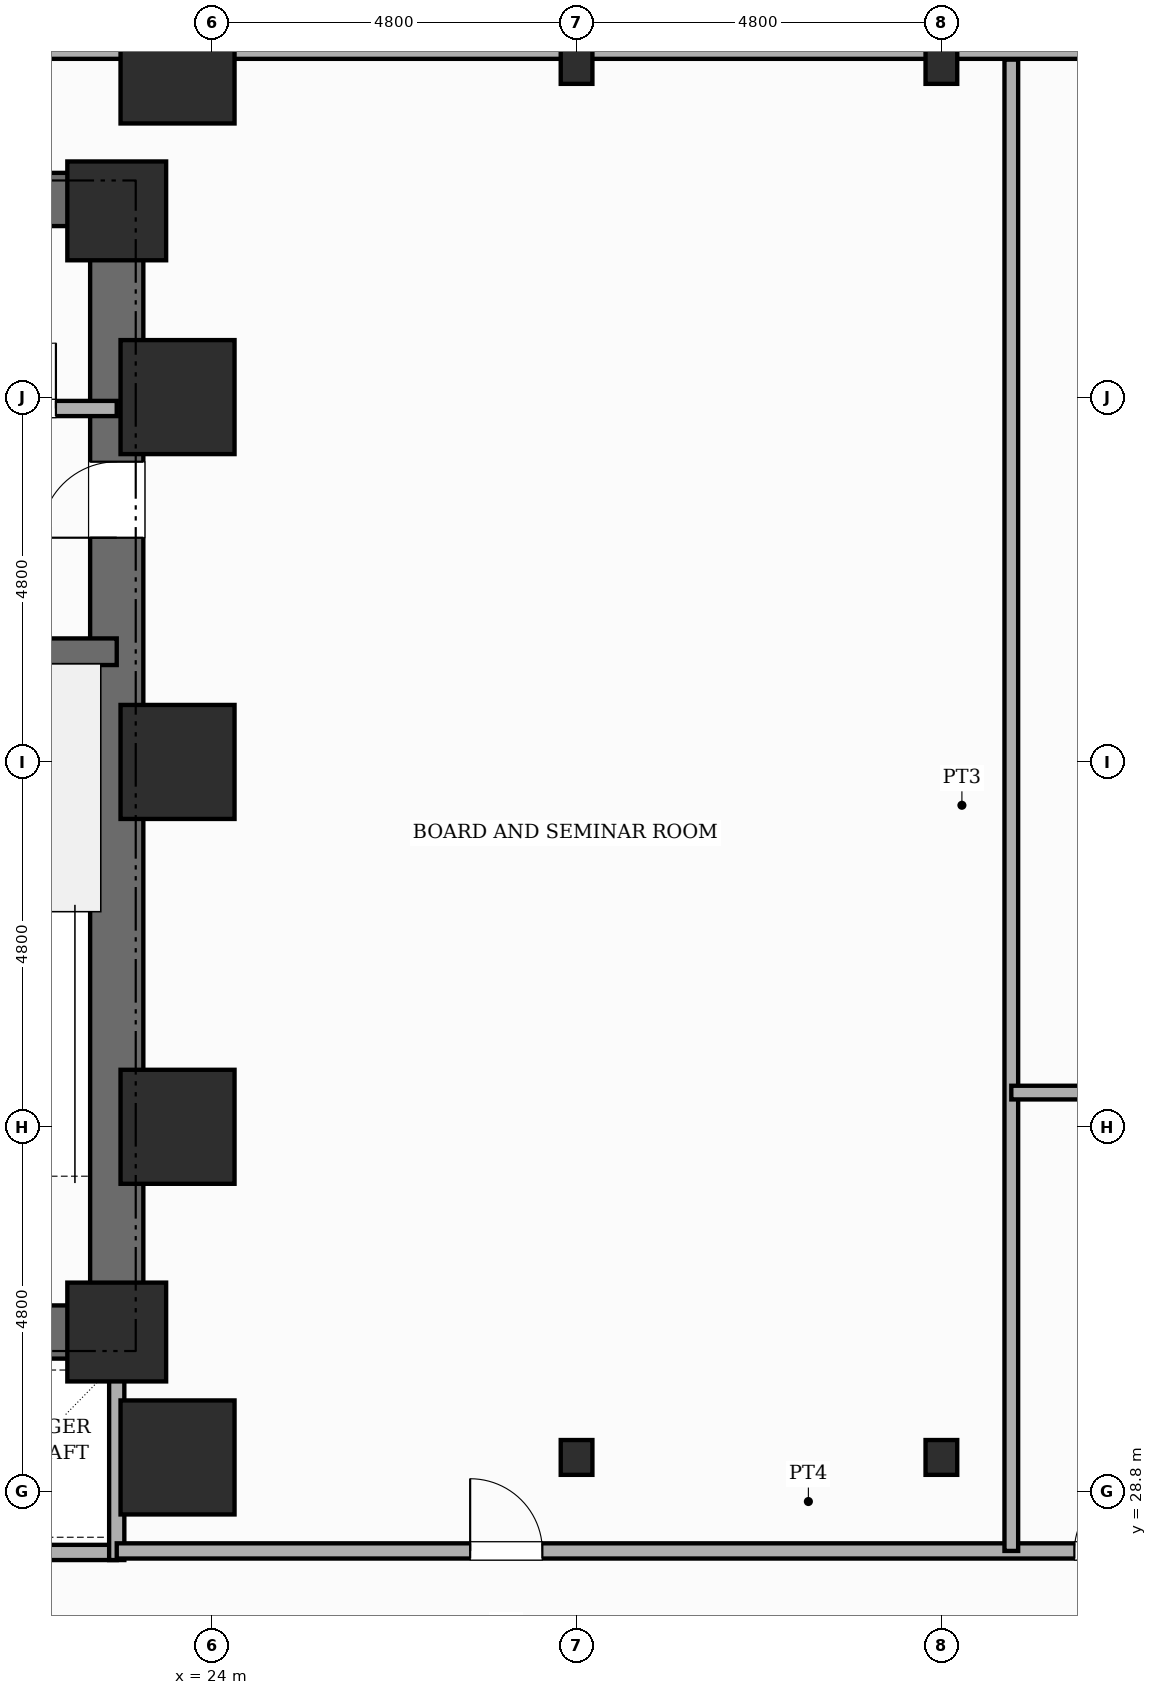
"""IFC4 building model, lengths in metres.
Left out: names, types, materials, properties, quantities, classifications, styles, units other than length and angle.
Written with IfcOpenShell. Run it as: python <this file> out.ifc"""

import sys

from ifc_helpers import new_model, si_unit, direction, frame, frame_2d, origin, origin_2d, place, context, subcontext, project, spatial, rectangle, i_section, extrude, element, fill, save


model = new_model("IFC4")
c1 = context("Model", 3, precision=1e-05, world=origin(), true_north=direction((0.0, 1.0)))
c2 = subcontext(c1, "Body", "Model", "MODEL_VIEW")
j1 = project(units=[si_unit("LENGTHUNIT", "METRE"), si_unit("PLANEANGLEUNIT", "RADIAN")], contexts=[c1])
p1 = place(None, origin())
s1 = spatial("IfcSite", under=j1, at=p1, CompositionType="ELEMENT")
p2 = place(p1, origin())
s2 = spatial("IfcBuilding", under=s1, at=p2, CompositionType="ELEMENT")
p3 = place(p2, frame((0.0, 0.0, 14.8)))
s3 = spatial("IfcBuildingStorey", under=s2, at=p3, CompositionType="ELEMENT", Elevation=14.8)
p4 = place(p3, frame((22.75, 30.55, 0.0), z_axis=(0.0, 0.0, 1.0), x_axis=(0.0, 1.0, 0.0)))
e1 = element("IfcWall", 1, at=p4, inside=s3, PredefinedType="SHEAR", context=c2, shape_type="SweptSolid", body=[
    extrude(rectangle(XDim=15.6, YDim=0.7, at=frame_2d((7.8, 0.0))), origin(), (0.0, 0.0, 1.0), 4.8),
])
p5 = place(p4, frame((10.8, 0.0, 0.0)))
e2 = element("IfcOpeningElement", 2, at=p5, cuts=e1, PredefinedType="OPENING", context=c2, shape_type="SweptSolid", body=[
    extrude(rectangle(XDim=1.0, YDim=2.15, at=frame_2d((0.5, 1.075))), frame((0.0, 0.36, 0.0), z_axis=(0.0, -1.0, 0.0), x_axis=(1.0, 0.0, 0.0)), (0.0, 0.0, 1.0), 0.72),
])
p6 = place(p3, frame((6.05, 45.8, 0.0), z_axis=(0.0, 0.0, 1.0), x_axis=(1.0, 0.0, 0.0)))
e3 = element("IfcWall", 3, at=p6, inside=s3, PredefinedType="SHEAR", context=c2, shape_type="SweptSolid", body=[
    extrude(rectangle(XDim=16.7, YDim=0.7, at=frame_2d((8.35, 0.0))), origin(), (0.0, 0.0, 1.0), 4.8),
])
p7 = place(p3, frame((18.84, 30.9, 0.0), z_axis=(0.0, 0.0, 1.0), x_axis=(1.0, 0.0, 0.0)))
e4 = element("IfcWall", 4, at=p7, inside=s3, PredefinedType="SHEAR", context=c2, shape_type="SweptSolid", body=[
    extrude(rectangle(XDim=3.91, YDim=0.7, at=frame_2d((1.955, 0.0))), origin(), (0.0, 0.0, 1.0), 4.8),
])
p8 = place(p3, frame((18.84, 39.85, 0.0), z_axis=(0.0, 0.0, 1.0), x_axis=(1.0, 0.0, 0.0)))
e5 = element("IfcWall", 5, at=p8, inside=s3, PredefinedType="SHEAR", context=c2, shape_type="SweptSolid", body=[
    extrude(rectangle(XDim=3.91, YDim=0.35, at=frame_2d((1.955, 0.0))), origin(), (0.0, 0.0, 1.0), 4.8),
])
for number, where, z_axis, x_axis in (
    (6, (22.75, 30.9, 0.0), (0.0, 0.0, 1.0), (1.0, 0.0, 0.0)),
    (7, (22.75, 45.65, 0.0), (0.0, 0.0, 1.0), (1.0, 0.0, 0.0)),
):
    element("IfcColumn", number, at=place(p3, frame(where, z_axis=z_axis, x_axis=x_axis)), inside=s3, PredefinedType="COLUMN", context=c2, shape_type="SweptSolid", body=[
        extrude(rectangle(XDim=1.3, YDim=1.3, at=origin_2d()), origin(), (0.0, 0.0, 1.0), 4.8),
    ])
for number, where, z_axis, x_axis in (
    (8, (23.55, 29.25, 0.0), (0.0, 0.0, 1.0), (1.0, 0.0, 0.0)),
    (9, (23.55, 33.6, 0.0), (0.0, 0.0, 1.0), (1.0, 0.0, 0.0)),
    (10, (23.55, 38.4, 0.0), (0.0, 0.0, 1.0), (1.0, 0.0, 0.0)),
    (11, (23.55, 43.2, 0.0), (0.0, 0.0, 1.0), (1.0, 0.0, 0.0)),
    (12, (23.55, 47.55, 0.0), (0.0, 0.0, 1.0), (1.0, 0.0, 0.0)),
):
    element("IfcColumn", number, at=place(p3, frame(where, z_axis=z_axis, x_axis=x_axis)), inside=s3, PredefinedType="USERDEFINED", context=c2, shape_type="SweptSolid", body=[
        extrude(rectangle(XDim=1.5, YDim=1.5, at=origin_2d()), origin(), (0.0, 0.0, 1.0), 4.8),
    ])
for number, where, z_axis, x_axis in (
    (13, (28.8, 29.25, 0.0), (0.0, 0.0, 1.0), (1.0, 0.0, 0.0)),
    (14, (28.8, 47.55, 0.0), (0.0, 0.0, 1.0), (1.0, 0.0, 0.0)),
    (15, (33.6, 29.25, 0.0), (0.0, 0.0, 1.0), (1.0, 0.0, 0.0)),
    (16, (33.6, 47.55, 0.0), (0.0, 0.0, 1.0), (1.0, 0.0, 0.0)),
):
    element("IfcColumn", number, at=place(p3, frame(where, z_axis=z_axis, x_axis=x_axis)), inside=s3, PredefinedType="COLUMN", context=c2, shape_type="SweptSolid", body=[
        extrude(i_section(OverallWidth=0.417, OverallDepth=0.458, WebThickness=0.03, FlangeThickness=0.045, FilletRadius=0.022, at=origin_2d()), origin(), (0.0, 0.0, 1.0), 4.8),
    ])
p9 = place(p3, frame((0.0, 47.825, 0.0), z_axis=(0.0, 0.0, 1.0), x_axis=(1.0, 0.0, 0.0)))
e17 = element("IfcWall", 17, at=p9, inside=s3, PredefinedType="STANDARD", context=c2, shape_type="SweptSolid", body=[
    extrude(rectangle(XDim=57.6, YDim=0.35, at=frame_2d((28.8, 0.0))), origin(), (0.0, 0.0, 1.0), 2.98),
])
p10 = place(p3, frame((18.84, 43.05, 0.0), z_axis=(0.0, 0.0, 1.0), x_axis=(1.0, 0.0, 0.0)))
e18 = element("IfcWall", 18, at=p10, inside=s3, PredefinedType="POLYGONAL", context=c2, shape_type="SweptSolid", body=[
    extrude(rectangle(XDim=3.91, YDim=0.2, at=frame_2d((1.955, 0.0))), origin(), (0.0, 0.0, 1.0), 3.48),
])
p11 = place(p10, frame((0.55, 0.0, 0.0)))
e19 = element("IfcOpeningElement", 19, at=p11, cuts=e18, PredefinedType="OPENING", context=c2, shape_type="SweptSolid", body=[
    extrude(rectangle(XDim=0.88, YDim=2.1, at=frame_2d((0.44, 1.05))), frame((0.0, 0.11, 0.0), z_axis=(0.0, -1.0, 0.0), x_axis=(1.0, 0.0, 0.0)), (0.0, 0.0, 1.0), 0.22),
])
p12 = place(p10, frame((2.25, 0.0, 0.0)))
e20 = element("IfcOpeningElement", 20, at=p12, cuts=e18, PredefinedType="OPENING", context=c2, shape_type="SweptSolid", body=[
    extrude(rectangle(XDim=0.86, YDim=2.1, at=frame_2d((0.43, 1.05))), frame((0.0, 0.11, 0.0), z_axis=(0.0, -1.0, 0.0), x_axis=(1.0, 0.0, 0.0)), (0.0, 0.0, 1.0), 0.22),
])
p13 = place(p3, frame((15.5, 28.0, 0.0), z_axis=(0.0, 0.0, 1.0), x_axis=(1.0, 0.0, 0.0)))
e21 = element("IfcWall", 21, at=p13, inside=s3, PredefinedType="POLYGONAL", context=c2, shape_type="SweptSolid", body=[
    extrude(rectangle(XDim=7.25, YDim=0.2, at=frame_2d((3.625, 0.0))), origin(), (0.0, 0.0, 1.0), 4.4),
])
p14 = place(p3, frame((22.75, 27.9, 0.0), z_axis=(0.0, 0.0, 1.0), x_axis=(0.0, 1.0, 0.0)))
e22 = element("IfcWall", 22, at=p14, inside=s3, PredefinedType="POLYGONAL", context=c2, shape_type="SweptSolid", body=[
    extrude(rectangle(XDim=3.0, YDim=0.2, at=frame_2d((1.5, 0.0))), origin(), (0.0, 0.0, 1.0), 4.4),
])
p15 = place(p3, frame((22.75, 28.02, 0.0), z_axis=(0.0, 0.0, 1.0), x_axis=(1.0, 0.0, 0.0)))
e23 = element("IfcWall", 23, at=p15, inside=s3, PredefinedType="PARTITIONING", context=c2, shape_type="SweptSolid", body=[
    extrude(rectangle(XDim=19.03, YDim=0.2, at=frame_2d((9.515, 0.0))), origin(), (0.0, 0.0, 1.0), 4.4),
])
p16 = place(p15, frame((4.65, 0.0, 0.0)))
e24 = element("IfcOpeningElement", 24, at=p16, cuts=e23, PredefinedType="OPENING", context=c2, shape_type="SweptSolid", body=[
    extrude(rectangle(XDim=0.95, YDim=2.15, at=frame_2d((0.475, 1.075))), frame((0.0, 0.11, 0.0), z_axis=(0.0, -1.0, 0.0), x_axis=(1.0, 0.0, 0.0)), (0.0, 0.0, 1.0), 0.22),
])
p17 = place(p15, frame((12.6, 0.0, 0.0)))
e25 = element("IfcOpeningElement", 25, at=p17, cuts=e23, PredefinedType="OPENING", context=c2, shape_type="SweptSolid", body=[
    extrude(rectangle(XDim=0.86, YDim=2.1, at=frame_2d((0.43, 1.05))), frame((0.0, 0.11, 0.0), z_axis=(0.0, -1.0, 0.0), x_axis=(1.0, 0.0, 0.0)), (0.0, 0.0, 1.0), 0.22),
])
p18 = place(p15, frame((16.2, 0.0, 0.0)))
e26 = element("IfcOpeningElement", 26, at=p18, cuts=e23, PredefinedType="OPENING", context=c2, shape_type="SweptSolid", body=[
    extrude(rectangle(XDim=0.86, YDim=2.1, at=frame_2d((0.43, 1.05))), frame((0.0, 0.11, 0.0), z_axis=(0.0, -1.0, 0.0), x_axis=(1.0, 0.0, 0.0)), (0.0, 0.0, 1.0), 0.22),
])
p19 = place(p3, frame((34.52, 28.02, 0.0), z_axis=(0.0, 0.0, 1.0), x_axis=(0.0, 1.0, 0.0)))
e27 = element("IfcWall", 27, at=p19, inside=s3, PredefinedType="PLUMBINGWALL", context=c2, shape_type="SweptSolid", body=[
    extrude(rectangle(XDim=19.62, YDim=0.18, at=frame_2d((9.81, 0.0))), origin(), (0.0, 0.0, 1.0), 4.4),
])
p20 = place(p3, frame((34.52, 34.05, 0.0), z_axis=(0.0, 0.0, 1.0), x_axis=(1.0, 0.0, 0.0)))
e28 = element("IfcWall", 28, at=p20, inside=s3, PredefinedType="PLUMBINGWALL", context=c2, shape_type="SweptSolid", body=[
    extrude(rectangle(XDim=7.26, YDim=0.18, at=frame_2d((3.63, 0.0))), origin(), (0.0, 0.0, 1.0), 4.4),
])
p21 = place(p5, origin())
e29 = element("IfcDoor", 29, at=p21, inside=s3, OperationType="SINGLE_SWING_LEFT", PredefinedType="DOOR", context=c2, shape_type="SweptSolid", body=[
    extrude(rectangle(XDim=1.0, YDim=2.15, at=frame_2d((0.5, 1.075))), frame((0.0, 0.025, 0.0), z_axis=(0.0, -1.0, 0.0), x_axis=(1.0, 0.0, 0.0)), (0.0, 0.0, 1.0), 0.05),
])
fill(e2, e29)
p22 = place(p12, origin())
e30 = element("IfcDoor", 30, at=p22, inside=s3, OperationType="SINGLE_SWING_RIGHT", PredefinedType="DOOR", context=c2, shape_type="SweptSolid", body=[
    extrude(rectangle(XDim=0.86, YDim=2.1, at=frame_2d((0.43, 1.05))), frame((0.0, 0.025, 0.0), z_axis=(0.0, -1.0, 0.0), x_axis=(1.0, 0.0, 0.0)), (0.0, 0.0, 1.0), 0.05),
])
fill(e20, e30)
p23 = place(p16, origin())
e31 = element("IfcDoor", 31, at=p23, inside=s3, OperationType="SINGLE_SWING_LEFT", PredefinedType="DOOR", context=c2, shape_type="SweptSolid", body=[
    extrude(rectangle(XDim=0.95, YDim=2.15, at=frame_2d((0.475, 1.075))), frame((0.0, 0.025, 0.0), z_axis=(0.0, -1.0, 0.0), x_axis=(1.0, 0.0, 0.0)), (0.0, 0.0, 1.0), 0.05),
])
fill(e24, e31)
p24 = place(p17, origin())
e32 = element("IfcDoor", 32, at=p24, inside=s3, OperationType="SINGLE_SWING_RIGHT", PredefinedType="DOOR", context=c2, shape_type="SweptSolid", body=[
    extrude(rectangle(XDim=0.86, YDim=2.1, at=frame_2d((0.43, 1.05))), frame((0.0, 0.025, 0.0), z_axis=(0.0, -1.0, 0.0), x_axis=(1.0, 0.0, 0.0)), (0.0, 0.0, 1.0), 0.05),
])
fill(e25, e32)
save(model, sys.argv[1])
